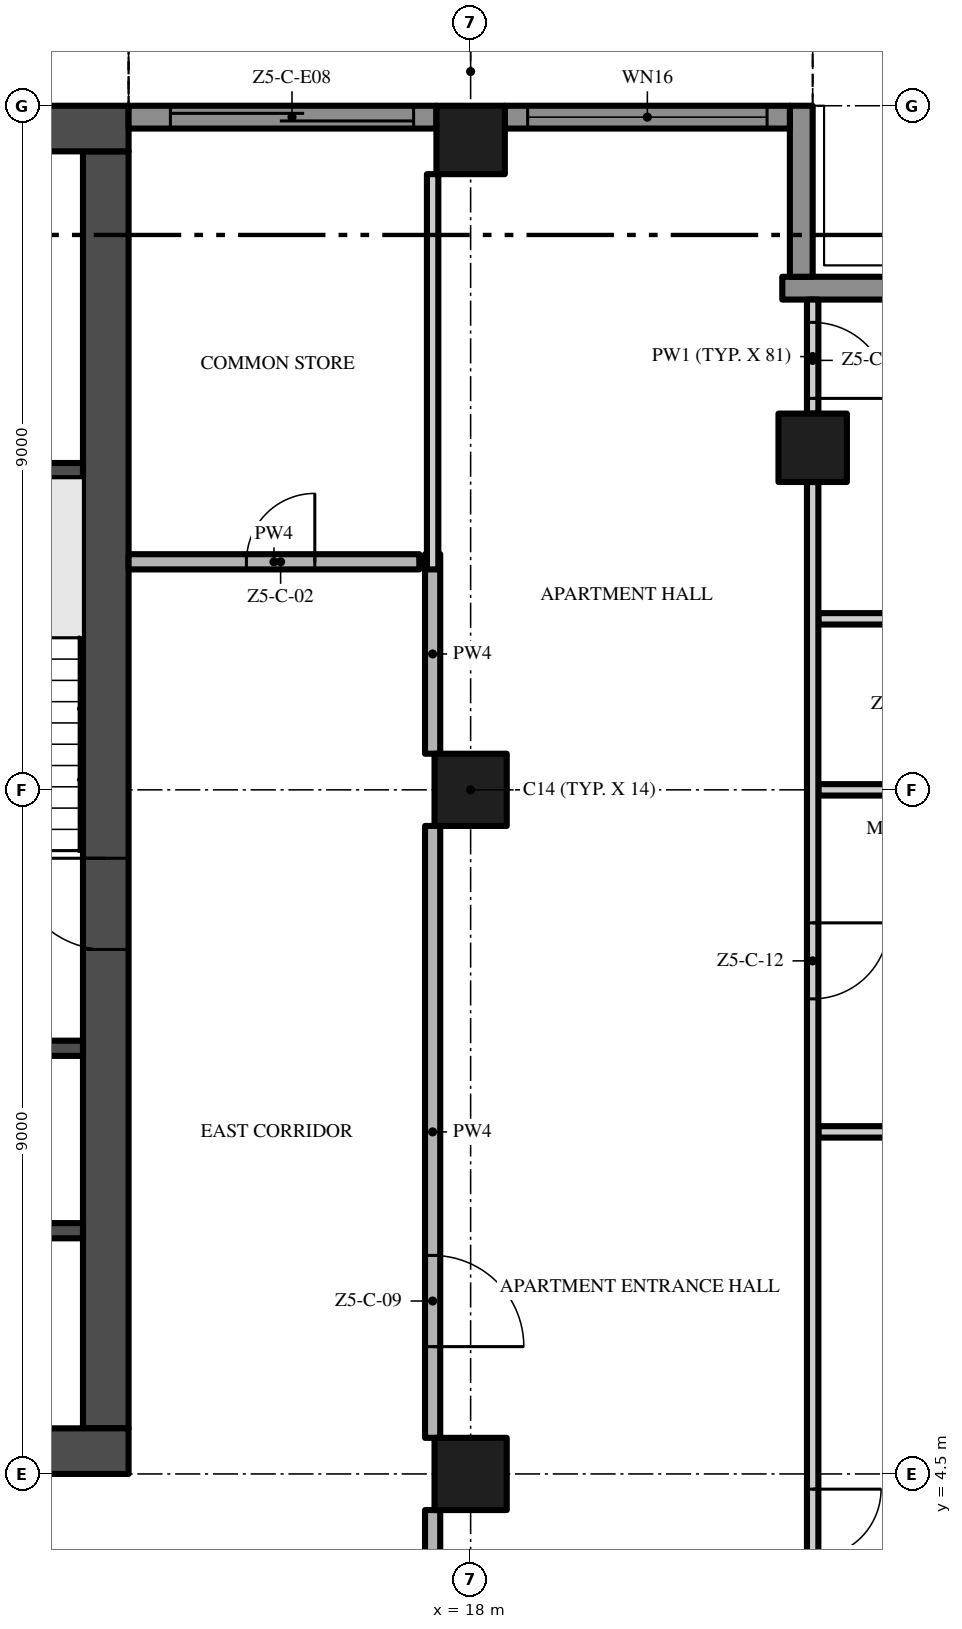
"""IFC4 building model, lengths in metres.
Left out: names, types, materials, properties, quantities, classifications, styles, units other than length and angle.
Written with IfcOpenShell. Run it as: python <this file> out.ifc"""

import sys

from ifc_helpers import new_model, si_unit, direction, frame, frame_2d, origin, origin_2d, place, context, subcontext, project, spatial, rectangle, extrude, element, fill, save


model = new_model("IFC4")
c1 = context("Model", 3, precision=1e-05, world=origin(), true_north=direction((0.0, 1.0)))
c2 = subcontext(c1, "Body", "Model", "MODEL_VIEW")
j1 = project(units=[si_unit("LENGTHUNIT", "METRE"), si_unit("PLANEANGLEUNIT", "RADIAN")], contexts=[c1])
p1 = place(None, origin())
s1 = spatial("IfcSite", under=j1, at=p1, CompositionType="ELEMENT")
p2 = place(p1, origin())
s2 = spatial("IfcBuilding", under=s1, at=p2, CompositionType="ELEMENT")
p3 = place(p2, frame((0.0, 0.0, 269.2)))
s3 = spatial("IfcBuildingStorey", under=s2, at=p3, CompositionType="ELEMENT", Elevation=269.2)
p4 = place(p3, frame((-13.5, 4.8, -0.3), z_axis=(0.0, 0.0, 1.0), x_axis=(1.0, 0.0, 0.0)))
e1 = element("IfcWall", 1, at=p4, inside=s3, PredefinedType="SHEAR", context=c2, shape_type="SweptSolid", body=[
    extrude(rectangle(XDim=27.0, YDim=0.6, at=frame_2d((13.5, 0.0))), origin(), (0.0, 0.0, 1.0), 3.8),
])
p5 = place(p4, frame((12.0, 0.0, 0.3)))
e2 = element("IfcOpeningElement", 2, at=p5, cuts=e1, PredefinedType="OPENING", context=c2, shape_type="SweptSolid", body=[
    extrude(rectangle(XDim=3.0, YDim=2.4, at=frame_2d((1.5, 1.2))), frame((0.0, 0.31, 0.0), z_axis=(0.0, -1.0, 0.0), x_axis=(1.0, 0.0, 0.0)), (0.0, 0.0, 1.0), 0.62),
])
p6 = place(p4, frame((4.9, 0.0, 0.3)))
e3 = element("IfcOpeningElement", 3, at=p6, cuts=e1, PredefinedType="OPENING", context=c2, shape_type="SweptSolid", body=[
    extrude(rectangle(XDim=1.2, YDim=2.2, at=frame_2d((0.6, 1.1))), frame((0.0, 0.31, 0.0), z_axis=(0.0, -1.0, 0.0), x_axis=(1.0, 0.0, 0.0)), (0.0, 0.0, 1.0), 0.62),
])
p7 = place(p4, frame((20.75, 0.0, 0.3)))
e4 = element("IfcOpeningElement", 4, at=p7, cuts=e1, PredefinedType="OPENING", context=c2, shape_type="SweptSolid", body=[
    extrude(rectangle(XDim=1.5, YDim=2.2, at=frame_2d((0.75, 1.1))), frame((0.0, 0.31, 0.0), z_axis=(0.0, -1.0, 0.0), x_axis=(1.0, 0.0, 0.0)), (0.0, 0.0, 1.0), 0.62),
])
p8 = place(p4, frame((17.4, 0.0, 0.3)))
e5 = element("IfcOpeningElement", 5, at=p8, cuts=e1, PredefinedType="OPENING", context=c2, shape_type="SweptSolid", body=[
    extrude(rectangle(XDim=1.2, YDim=2.2, at=frame_2d((0.6, 1.1))), frame((0.0, 0.31, 0.0), z_axis=(0.0, -1.0, 0.0), x_axis=(1.0, 0.0, 0.0)), (0.0, 0.0, 1.0), 0.62),
])
p9 = place(p3, frame((13.2, 5.1, -0.3), z_axis=(0.0, 0.0, 1.0), x_axis=(0.0, 1.0, 0.0)))
e6 = element("IfcWall", 6, at=p9, inside=s3, PredefinedType="SHEAR", context=c2, shape_type="SweptSolid", body=[
    extrude(rectangle(XDim=16.8, YDim=0.6, at=frame_2d((8.4, 0.0))), origin(), (0.0, 0.0, 1.0), 3.8),
])
p10 = place(p9, frame((6.3, 0.0, 0.3)))
e7 = element("IfcOpeningElement", 7, at=p10, cuts=e6, PredefinedType="OPENING", context=c2, shape_type="SweptSolid", body=[
    extrude(rectangle(XDim=1.2, YDim=2.2, at=frame_2d((0.6, 1.1))), frame((0.0, 0.31, 0.0), z_axis=(0.0, -1.0, 0.0), x_axis=(1.0, 0.0, 0.0)), (0.0, 0.0, 1.0), 0.62),
])
p11 = place(p3, frame((13.5, 22.2, -0.3), z_axis=(0.0, 0.0, 1.0), x_axis=(-1.0, 0.0, 0.0)))
e8 = element("IfcWall", 8, at=p11, inside=s3, PredefinedType="SHEAR", context=c2, shape_type="SweptSolid", body=[
    extrude(rectangle(XDim=27.0, YDim=0.6, at=frame_2d((13.5, 0.0))), origin(), (0.0, 0.0, 1.0), 3.8),
])
p12 = place(p3, frame((18.0, 13.5, 0.0), z_axis=(0.0, 0.0, 1.0), x_axis=(1.0, 0.0, 0.0)))
e9 = element("IfcColumn", 9, at=p12, inside=s3, PredefinedType="COLUMN", context=c2, shape_type="SweptSolid", body=[
    extrude(rectangle(XDim=0.95, YDim=0.95, at=origin_2d()), origin(), (0.0, 0.0, 1.0), 3.5),
])
p13 = place(p3, frame((18.0, 22.05, 0.0), z_axis=(0.0, 0.0, 1.0), x_axis=(1.0, 0.0, 0.0)))
e10 = element("IfcColumn", 10, at=p13, inside=s3, PredefinedType="COLUMN", context=c2, shape_type="SweptSolid", body=[
    extrude(rectangle(XDim=0.9, YDim=0.9, at=origin_2d()), origin(), (0.0, 0.0, 1.0), 3.5),
])
p14 = place(p3, frame((18.0, 4.5, 0.0), z_axis=(0.0, 0.0, 1.0), x_axis=(1.0, 0.0, 0.0)))
e11 = element("IfcColumn", 11, at=p14, inside=s3, PredefinedType="COLUMN", context=c2, shape_type="SweptSolid", body=[
    extrude(rectangle(XDim=0.95, YDim=0.95, at=origin_2d()), origin(), (0.0, 0.0, 1.0), 3.5),
])
p15 = place(p3, frame((22.5, 18.0, 0.0), z_axis=(0.0, 0.0, 1.0), x_axis=(1.0, 0.0, 0.0)))
e12 = element("IfcColumn", 12, at=p15, inside=s3, PredefinedType="COLUMN", context=c2, shape_type="SweptSolid", body=[
    extrude(rectangle(XDim=0.9, YDim=0.9, at=origin_2d()), origin(), (0.0, 0.0, 1.0), 3.5),
])
p16 = place(p3, frame((22.1, 20.1, 0.0), z_axis=(0.0, 0.0, 1.0), x_axis=(1.0, 0.0, 0.0)))
e13 = element("IfcWall", 13, at=p16, inside=s3, PredefinedType="SOLIDWALL", context=c2, shape_type="SweptSolid", body=[
    extrude(rectangle(XDim=2.35, YDim=0.3, at=frame_2d((1.175, 0.0))), origin(), (0.0, 0.0, 1.0), 3.5),
])
p17 = place(p3, frame((22.35, 22.5, 0.0), z_axis=(0.0, 0.0, 1.0), x_axis=(0.0, -1.0, 0.0)))
e14 = element("IfcWall", 14, at=p17, inside=s3, PredefinedType="SOLIDWALL", context=c2, shape_type="SweptSolid", body=[
    extrude(rectangle(XDim=2.25, YDim=0.3, at=frame_2d((1.125, 0.0))), origin(), (0.0, 0.0, 1.0), 3.5),
])
p18 = place(p3, frame((18.45, 22.35, 0.0), z_axis=(0.0, 0.0, 1.0), x_axis=(1.0, 0.0, 0.0)))
e15 = element("IfcWall", 15, at=p18, inside=s3, PredefinedType="SOLIDWALL", context=c2, shape_type="SweptSolid", body=[
    extrude(rectangle(XDim=3.75, YDim=0.3, at=frame_2d((1.875, 0.0))), origin(), (0.0, 0.0, 1.0), 3.5),
])
p19 = place(p18, frame((0.3, 0.0, 0.45)))
e16 = element("IfcOpeningElement", 16, at=p19, cuts=e15, PredefinedType="OPENING", context=c2, shape_type="SweptSolid", body=[
    extrude(rectangle(XDim=3.15, YDim=2.65, at=frame_2d((1.575, 1.325))), frame((0.0, 0.16, 0.0), z_axis=(0.0, -1.0, 0.0), x_axis=(1.0, 0.0, 0.0)), (0.0, 0.0, 1.0), 0.32),
])
p20 = place(p3, frame((13.5, 22.35, 0.0), z_axis=(0.0, 0.0, 1.0), x_axis=(1.0, 0.0, 0.0)))
e17 = element("IfcWall", 17, at=p20, inside=s3, PredefinedType="SOLIDWALL", context=c2, shape_type="SweptSolid", body=[
    extrude(rectangle(XDim=4.05, YDim=0.3, at=frame_2d((2.025, 0.0))), origin(), (0.0, 0.0, 1.0), 3.5),
])
p21 = place(p20, frame((0.55, 0.0, 0.0)))
e18 = element("IfcOpeningElement", 18, at=p21, cuts=e17, PredefinedType="OPENING", context=c2, shape_type="SweptSolid", body=[
    extrude(rectangle(XDim=3.2, YDim=2.4, at=frame_2d((1.6, 1.2))), frame((0.0, 0.16, 0.0), z_axis=(0.0, -1.0, 0.0), x_axis=(1.0, 0.0, 0.0)), (0.0, 0.0, 1.0), 0.32),
])
for number, where, z_axis, x_axis in (
    (19, (9.65, 7.7, 0.0), (0.0, 0.0, 1.0), (1.0, 0.0, 0.0)),
    (20, (9.65, 10.1, 0.0), (0.0, 0.0, 1.0), (1.0, 0.0, 0.0)),
    (21, (9.65, 17.7, 0.0), (0.0, 0.0, 1.0), (1.0, 0.0, 0.0)),
):
    element("IfcWall", number, at=place(p3, frame(where, z_axis=z_axis, x_axis=x_axis)), inside=s3, PredefinedType="SHEAR", context=c2, shape_type="SweptSolid", body=[
        extrude(rectangle(XDim=3.25, YDim=0.2, at=frame_2d((1.625, 0.0))), origin(), (0.0, 0.0, 1.0), 3.5),
    ])
p22 = place(p3, frame((22.575, 9.0, 0.0), z_axis=(0.0, 0.0, 1.0), x_axis=(1.0, 0.0, 0.0)))
e22 = element("IfcWall", 22, at=p22, inside=s3, PredefinedType="PARTITIONING", context=c2, shape_type="SweptSolid", body=[
    extrude(rectangle(XDim=4.125, YDim=0.15, at=frame_2d((2.062, 0.0))), origin(), (0.0, 0.0, 1.0), 3.5),
])
p23 = place(p3, frame((22.575, 13.5, 0.0), z_axis=(0.0, 0.0, 1.0), x_axis=(1.0, 0.0, 0.0)))
e23 = element("IfcWall", 23, at=p23, inside=s3, PredefinedType="PARTITIONING", context=c2, shape_type="SweptSolid", body=[
    extrude(rectangle(XDim=3.525, YDim=0.15, at=frame_2d((1.762, 0.0))), origin(), (0.0, 0.0, 1.0), 3.5),
])
p24 = place(p3, frame((22.575, 15.75, 0.0), z_axis=(0.0, 0.0, 1.0), x_axis=(1.0, 0.0, 0.0)))
e24 = element("IfcWall", 24, at=p24, inside=s3, PredefinedType="PARTITIONING", context=c2, shape_type="SweptSolid", body=[
    extrude(rectangle(XDim=1.875, YDim=0.15, at=frame_2d((0.938, 0.0))), origin(), (0.0, 0.0, 1.0), 3.5),
])
p25 = place(p3, frame((13.5, 16.5, 0.0), z_axis=(0.0, 0.0, 1.0), x_axis=(1.0, 0.0, 0.0)))
e25 = element("IfcWall", 25, at=p25, inside=s3, PredefinedType="PARTITIONING", context=c2, shape_type="SweptSolid", body=[
    extrude(rectangle(XDim=3.825, YDim=0.2, at=frame_2d((1.913, 0.0))), origin(), (0.0, 0.0, 1.0), 3.5),
])
p26 = place(p25, frame((1.55, 0.0, 0.0)))
e26 = element("IfcOpeningElement", 26, at=p26, cuts=e25, PredefinedType="OPENING", context=c2, shape_type="SweptSolid", body=[
    extrude(rectangle(XDim=0.9, YDim=2.1, at=frame_2d((0.45, 1.05))), frame((0.0, 0.11, 0.0), z_axis=(0.0, -1.0, 0.0), x_axis=(1.0, 0.0, 0.0)), (0.0, 0.0, 1.0), 0.22),
])
p27 = place(p3, frame((17.5, -0.2, 0.0), z_axis=(0.0, 0.0, 1.0), x_axis=(0.0, 1.0, 0.0)))
e27 = element("IfcWall", 27, at=p27, inside=s3, PredefinedType="PARTITIONING", context=c2, shape_type="SweptSolid", body=[
    extrude(rectangle(XDim=4.225, YDim=0.2, at=frame_2d((2.112, 0.0))), origin(), (0.0, 0.0, 1.0), 3.5),
])
p28 = place(p3, frame((17.5, 13.025, 0.0), z_axis=(0.0, 0.0, 1.0), x_axis=(0.0, -1.0, 0.0)))
e28 = element("IfcWall", 28, at=p28, inside=s3, PredefinedType="PARTITIONING", context=c2, shape_type="SweptSolid", body=[
    extrude(rectangle(XDim=8.05, YDim=0.2, at=frame_2d((4.025, 0.0))), origin(), (0.0, 0.0, 1.0), 3.5),
])
p29 = place(p28, frame((5.65, 0.0, 0.0)))
e29 = element("IfcOpeningElement", 29, at=p29, cuts=e28, PredefinedType="OPENING", context=c2, shape_type="SweptSolid", body=[
    extrude(rectangle(XDim=1.2, YDim=2.4, at=frame_2d((0.6, 1.2))), frame((0.0, 0.11, 0.0), z_axis=(0.0, -1.0, 0.0), x_axis=(1.0, 0.0, 0.0)), (0.0, 0.0, 1.0), 0.22),
])
p30 = place(p3, frame((17.5, 13.975, 0.0), z_axis=(0.0, 0.0, 1.0), x_axis=(0.0, 1.0, 0.0)))
e30 = element("IfcWall", 30, at=p30, inside=s3, PredefinedType="PARTITIONING", context=c2, shape_type="SweptSolid", body=[
    extrude(rectangle(XDim=2.625, YDim=0.2, at=frame_2d((1.312, 0.0))), origin(), (0.0, 0.0, 1.0), 3.5),
])
p31 = place(p3, frame((17.5, 16.4, 0.0), z_axis=(0.0, 0.0, 1.0), x_axis=(0.0, 1.0, 0.0)))
e31 = element("IfcWall", 31, at=p31, inside=s3, PredefinedType="PARTITIONING", context=c2, shape_type="SweptSolid", body=[
    extrude(rectangle(XDim=5.2, YDim=0.15, at=frame_2d((2.6, 0.0))), origin(), (0.0, 0.0, 1.0), 3.5),
])
p32 = place(p3, frame((22.5, 17.55, 0.0), z_axis=(0.0, 0.0, 1.0), x_axis=(0.0, -1.0, 0.0)))
e32 = element("IfcWall", 32, at=p32, inside=s3, PredefinedType="PARTITIONING", context=c2, shape_type="SweptSolid", body=[
    extrude(rectangle(XDim=17.45, YDim=0.15, at=frame_2d((8.725, 0.0))), origin(), (0.0, 0.0, 1.0), 3.5),
])
p33 = place(p32, frame((13.25, 0.0, 0.0)))
e33 = element("IfcOpeningElement", 33, at=p33, cuts=e32, PredefinedType="OPENING", context=c2, shape_type="SweptSolid", body=[
    extrude(rectangle(XDim=1.8, YDim=2.4, at=frame_2d((0.9, 1.2))), frame((0.0, 0.085, 0.0), z_axis=(0.0, -1.0, 0.0), x_axis=(1.0, 0.0, 0.0)), (0.0, 0.0, 1.0), 0.17),
])
p34 = place(p32, frame((5.8, 0.0, 0.0)))
e34 = element("IfcOpeningElement", 34, at=p34, cuts=e32, PredefinedType="OPENING", context=c2, shape_type="SweptSolid", body=[
    extrude(rectangle(XDim=1.0, YDim=2.4, at=frame_2d((0.5, 1.2))), frame((0.0, 0.085, 0.0), z_axis=(0.0, -1.0, 0.0), x_axis=(1.0, 0.0, 0.0)), (0.0, 0.0, 1.0), 0.17),
])
p35 = place(p3, frame((22.5, 19.95, 0.0), z_axis=(0.0, 0.0, 1.0), x_axis=(0.0, -1.0, 0.0)))
e35 = element("IfcWall", 35, at=p35, inside=s3, PredefinedType="PARTITIONING", context=c2, shape_type="SweptSolid", body=[
    extrude(rectangle(XDim=1.5, YDim=0.15, at=frame_2d((0.75, 0.0))), origin(), (0.0, 0.0, 1.0), 3.5),
])
p36 = place(p35, frame((0.3, 0.0, 0.0)))
e36 = element("IfcOpeningElement", 36, at=p36, cuts=e35, PredefinedType="OPENING", context=c2, shape_type="SweptSolid", body=[
    extrude(rectangle(XDim=1.0, YDim=2.4, at=frame_2d((0.5, 1.2))), frame((0.0, 0.085, 0.0), z_axis=(0.0, -1.0, 0.0), x_axis=(1.0, 0.0, 0.0)), (0.0, 0.0, 1.0), 0.17),
])
p37 = place(p19, origin())
e37 = element("IfcWindow", 37, at=p37, inside=s3, PartitioningType="SINGLE_PANEL", PredefinedType="WINDOW", context=c2, shape_type="SweptSolid", body=[
    extrude(rectangle(XDim=3.15, YDim=2.65, at=frame_2d((1.575, 1.325))), frame((0.0, 0.03, 0.0), z_axis=(0.0, -1.0, 0.0), x_axis=(1.0, 0.0, 0.0)), (0.0, 0.0, 1.0), 0.06),
])
fill(e16, e37)
p38 = place(p21, origin())
e38 = element("IfcDoor", 38, at=p38, inside=s3, OperationType="SINGLE_SWING_LEFT", PredefinedType="DOOR", context=c2, shape_type="SweptSolid", body=[
    extrude(rectangle(XDim=3.2, YDim=2.4, at=frame_2d((1.6, 1.2))), frame((0.0, 0.025, 0.0), z_axis=(0.0, -1.0, 0.0), x_axis=(1.0, 0.0, 0.0)), (0.0, 0.0, 1.0), 0.05),
])
fill(e18, e38)
p39 = place(p10, frame((1.2, 0.0, 0.0), z_axis=(0.0, 0.0, 1.0), x_axis=(-1.0, 0.0, 0.0)))
e39 = element("IfcDoor", 39, at=p39, inside=s3, OperationType="SINGLE_SWING_LEFT", PredefinedType="DOOR", context=c2, shape_type="SweptSolid", body=[
    extrude(rectangle(XDim=1.2, YDim=2.2, at=frame_2d((0.6, 1.1))), frame((0.0, 0.025, 0.0), z_axis=(0.0, -1.0, 0.0), x_axis=(1.0, 0.0, 0.0)), (0.0, 0.0, 1.0), 0.05),
])
fill(e7, e39)
p40 = place(p26, origin())
e40 = element("IfcDoor", 40, at=p40, inside=s3, OperationType="SINGLE_SWING_RIGHT", PredefinedType="DOOR", context=c2, shape_type="SweptSolid", body=[
    extrude(rectangle(XDim=0.9, YDim=2.1, at=frame_2d((0.45, 1.05))), frame((0.0, 0.025, 0.0), z_axis=(0.0, -1.0, 0.0), x_axis=(1.0, 0.0, 0.0)), (0.0, 0.0, 1.0), 0.05),
])
fill(e26, e40)
p41 = place(p29, origin())
e41 = element("IfcDoor", 41, at=p41, inside=s3, OperationType="SINGLE_SWING_RIGHT", PredefinedType="DOOR", context=c2, shape_type="SweptSolid", body=[
    extrude(rectangle(XDim=1.2, YDim=2.4, at=frame_2d((0.6, 1.2))), frame((0.0, 0.025, 0.0), z_axis=(0.0, -1.0, 0.0), x_axis=(1.0, 0.0, 0.0)), (0.0, 0.0, 1.0), 0.05),
])
fill(e29, e41)
p42 = place(p33, origin())
e42 = element("IfcDoor", 42, at=p42, inside=s3, OperationType="DOUBLE_DOOR_SINGLE_SWING", PredefinedType="DOOR", context=c2, shape_type="SweptSolid", body=[
    extrude(rectangle(XDim=1.8, YDim=2.4, at=frame_2d((0.9, 1.2))), frame((0.0, 0.025, 0.0), z_axis=(0.0, -1.0, 0.0), x_axis=(1.0, 0.0, 0.0)), (0.0, 0.0, 1.0), 0.05),
])
fill(e33, e42)
p43 = place(p34, origin())
e43 = element("IfcDoor", 43, at=p43, inside=s3, OperationType="SINGLE_SWING_LEFT", PredefinedType="DOOR", context=c2, shape_type="SweptSolid", body=[
    extrude(rectangle(XDim=1.0, YDim=2.4, at=frame_2d((0.5, 1.2))), frame((0.0, 0.025, 0.0), z_axis=(0.0, -1.0, 0.0), x_axis=(1.0, 0.0, 0.0)), (0.0, 0.0, 1.0), 0.05),
])
fill(e34, e43)
p44 = place(p36, origin())
e44 = element("IfcDoor", 44, at=p44, inside=s3, OperationType="SINGLE_SWING_RIGHT", PredefinedType="DOOR", context=c2, shape_type="SweptSolid", body=[
    extrude(rectangle(XDim=1.0, YDim=2.4, at=frame_2d((0.5, 1.2))), frame((0.0, 0.025, 0.0), z_axis=(0.0, -1.0, 0.0), x_axis=(1.0, 0.0, 0.0)), (0.0, 0.0, 1.0), 0.05),
])
fill(e36, e44)
save(model, sys.argv[1])
